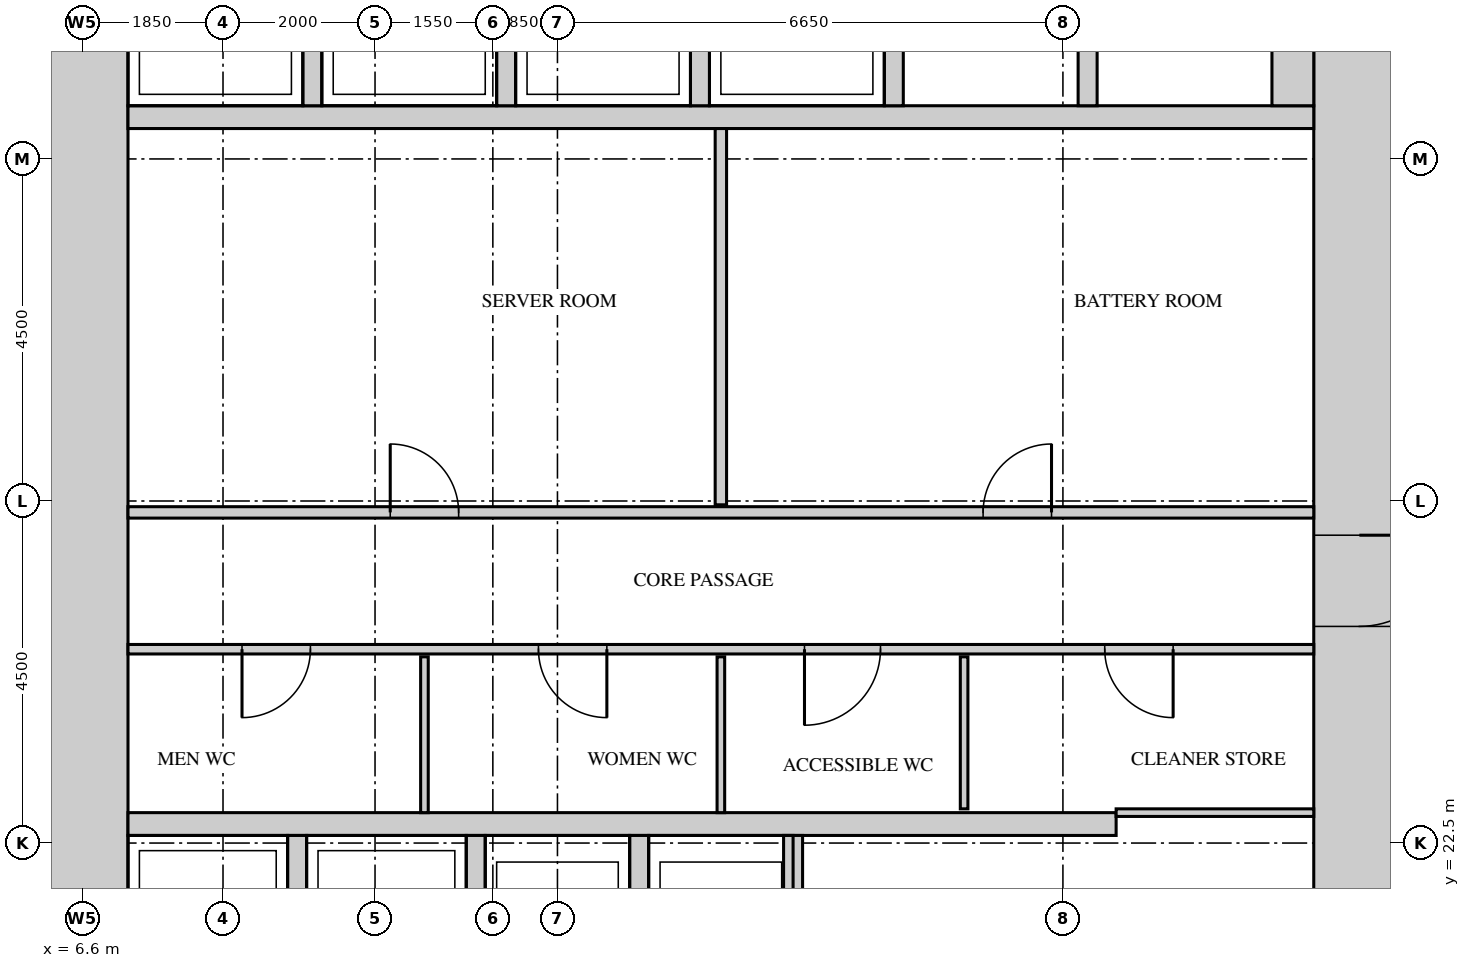
"""IFC4 building model, lengths in metres.
Left out: names, types, materials, properties, quantities, classifications, styles, units other than length and angle.
Written with IfcOpenShell. Run it as: python <this file> out.ifc"""

import sys

from ifc_helpers import new_model, si_unit, direction, frame, frame_2d, origin, place, context, subcontext, project, spatial, rectangle, extrude, source, transform, mapped, element, fill, save


model = new_model("IFC4")
c1 = context("Model", 3, precision=1e-05, world=origin(), true_north=direction((0.0, 1.0)))
c2 = subcontext(c1, "Body", "Model", "MODEL_VIEW")
j1 = project(units=[si_unit("LENGTHUNIT", "METRE"), si_unit("PLANEANGLEUNIT", "RADIAN")], contexts=[c1])
p1 = place(None, origin())
s1 = spatial("IfcSite", under=j1, at=p1, CompositionType="ELEMENT")
p2 = place(p1, origin())
s2 = spatial("IfcBuilding", under=s1, at=p2, CompositionType="ELEMENT")
p3 = place(p2, frame((0.0, 0.0, 60.0)))
s3 = spatial("IfcBuildingStorey", under=s2, at=p3, CompositionType="ELEMENT", Elevation=60.0)
m1 = source(origin(), c2, "Body", "SweptSolid", [
    extrude(rectangle(XDim=27.6, YDim=1.2, at=frame_2d((13.8, 0.0))), origin(), (0.0, 0.0, 1.0), 4.2),
])
p4 = place(p3, frame((23.4, 13.2, 0.0), z_axis=(0.0, 0.0, 1.0), x_axis=(0.0, 1.0, 0.0)))
e1 = element("IfcWall", 1, at=p4, inside=s3, PredefinedType="SHEAR", context=c2, shape_type="MappedRepresentation", body=[
    mapped(m1, transform((0.0, 0.0, 0.0))),
])
m2 = source(origin(), c2, "Body", "SweptSolid", [
    extrude(rectangle(XDim=1.8, YDim=2.1, at=frame_2d((0.9, 1.05))), frame((0.0, 0.61, 0.0), z_axis=(0.0, -1.0, 0.0), x_axis=(1.0, 0.0, 0.0)), (0.0, 0.0, 1.0), 1.22),
])
p5 = place(p4, frame((22.4, 0.0, 0.0)))
e2 = element("IfcOpeningElement", 2, at=p5, cuts=e1, PredefinedType="OPENING", context=c2, shape_type="MappedRepresentation", body=[
    mapped(m2, transform((0.0, 0.0, 0.0))),
])
m3 = source(origin(), c2, "Body", "SweptSolid", [
    extrude(rectangle(XDim=1.2, YDim=2.1, at=frame_2d((0.6, 1.05))), frame((0.0, 0.61, 0.0), z_axis=(0.0, -1.0, 0.0), x_axis=(1.0, 0.0, 0.0)), (0.0, 0.0, 1.0), 1.22),
])
p6 = place(p4, frame((12.15, 0.0, 0.0)))
e3 = element("IfcOpeningElement", 3, at=p6, cuts=e1, PredefinedType="OPENING", context=c2, shape_type="MappedRepresentation", body=[
    mapped(m3, transform((0.0, 0.0, 0.0))),
])
m4 = source(origin(), c2, "Body", "SweptSolid", [
    extrude(rectangle(XDim=0.9, YDim=2.1, at=frame_2d((0.45, 1.05))), frame((0.0, 0.61, 0.0), z_axis=(0.0, -1.0, 0.0), x_axis=(1.0, 0.0, 0.0)), (0.0, 0.0, 1.0), 1.22),
])
p7 = place(p4, frame((4.4, 0.0, 0.0)))
e4 = element("IfcOpeningElement", 4, at=p7, cuts=e1, PredefinedType="OPENING", context=c2, shape_type="MappedRepresentation", body=[
    mapped(m4, transform((0.0, 0.0, 0.0))),
])
p8 = place(p3, frame((6.6, 13.2, 0.0), z_axis=(0.0, 0.0, 1.0), x_axis=(0.0, 1.0, 0.0)))
e5 = element("IfcWall", 5, at=p8, inside=s3, PredefinedType="SHEAR", context=c2, shape_type="MappedRepresentation", body=[
    mapped(m1, transform((0.0, 0.0, 0.0))),
])
m5 = source(origin(), c2, "Body", "SweptSolid", [
    extrude(rectangle(XDim=13.0, YDim=0.3, at=frame_2d((6.5, 0.0))), origin(), (0.0, 0.0, 1.0), 4.2),
])
p9 = place(p3, frame((7.2, 22.75, 0.0), z_axis=(0.0, 0.0, 1.0), x_axis=(1.0, 0.0, 0.0)))
e6 = element("IfcWall", 6, at=p9, inside=s3, PredefinedType="STANDARD", context=c2, shape_type="MappedRepresentation", body=[
    mapped(m5, transform((0.0, 0.0, 0.0))),
])
m6 = source(origin(), c2, "Body", "SweptSolid", [
    extrude(rectangle(XDim=15.6, YDim=0.3, at=frame_2d((7.8, 0.0))), origin(), (0.0, 0.0, 1.0), 4.2),
])
p10 = place(p3, frame((7.2, 32.05, 0.0), z_axis=(0.0, 0.0, 1.0), x_axis=(1.0, 0.0, 0.0)))
e7 = element("IfcWall", 7, at=p10, inside=s3, PredefinedType="STANDARD", context=c2, shape_type="MappedRepresentation", body=[
    mapped(m6, transform((0.0, 0.0, 0.0))),
])
m7 = source(origin(), c2, "Body", "SweptSolid", [
    extrude(rectangle(XDim=3.1, YDim=0.25, at=frame_2d((1.55, 0.0))), origin(), (0.0, 0.0, 1.0), 4.2),
])
for number, where, z_axis, x_axis in (
    (8, (9.425, 19.5, 0.0), (0.0, 0.0, 1.0), (0.0, 1.0, 0.0)),
    (9, (11.775, 19.5, 0.0), (0.0, 0.0, 1.0), (0.0, 1.0, 0.0)),
    (10, (13.925, 19.5, 0.0), (0.0, 0.0, 1.0), (0.0, 1.0, 0.0)),
    (11, (15.95, 19.5, 0.0), (0.0, 0.0, 1.0), (0.0, 1.0, 0.0)),
):
    element("IfcWall", number, at=place(p3, frame(where, z_axis=z_axis, x_axis=x_axis)), inside=s3, PredefinedType="STANDARD", context=c2, shape_type="MappedRepresentation", body=[
        mapped(m7, transform((0.0, 0.0, 0.0))),
    ])
m8 = source(origin(), c2, "Body", "SweptSolid", [
    extrude(rectangle(XDim=2.4, YDim=0.25, at=frame_2d((1.2, 0.0))), origin(), (0.0, 0.0, 1.0), 4.2),
])
for number, where, z_axis, x_axis in (
    (12, (9.625, 32.2, 0.0), (0.0, 0.0, 1.0), (0.0, 1.0, 0.0)),
    (13, (12.175, 32.2, 0.0), (0.0, 0.0, 1.0), (0.0, 1.0, 0.0)),
    (14, (14.725, 32.2, 0.0), (0.0, 0.0, 1.0), (0.0, 1.0, 0.0)),
    (15, (17.275, 32.2, 0.0), (0.0, 0.0, 1.0), (0.0, 1.0, 0.0)),
    (16, (19.825, 32.2, 0.0), (0.0, 0.0, 1.0), (0.0, 1.0, 0.0)),
):
    element("IfcWall", number, at=place(p3, frame(where, z_axis=z_axis, x_axis=x_axis)), inside=s3, PredefinedType="STANDARD", context=c2, shape_type="MappedRepresentation", body=[
        mapped(m8, transform((0.0, 0.0, 0.0))),
    ])
m9 = source(origin(), c2, "Body", "SweptSolid", [
    extrude(rectangle(XDim=2.4, YDim=0.55, at=frame_2d((1.2, 0.0))), origin(), (0.0, 0.0, 1.0), 4.2),
])
p11 = place(p3, frame((22.525, 32.2, 0.0), z_axis=(0.0, 0.0, 1.0), x_axis=(0.0, 1.0, 0.0)))
e17 = element("IfcWall", 17, at=p11, inside=s3, PredefinedType="STANDARD", context=c2, shape_type="MappedRepresentation", body=[
    mapped(m9, transform((0.0, 0.0, 0.0))),
])
m10 = source(origin(), c2, "Body", "SweptSolid", [
    extrude(rectangle(XDim=2.05, YDim=0.1, at=frame_2d((1.025, 0.0))), origin(), (0.0, 0.0, 1.0), 4.3),
])
for number, where, z_axis, x_axis in (
    (18, (11.1, 22.9, 0.0), (0.0, 0.0, 1.0), (0.0, 1.0, 0.0)),
    (19, (15.0, 22.9, 0.0), (0.0, 0.0, 1.0), (0.0, 1.0, 0.0)),
):
    element("IfcWall", number, at=place(p3, frame(where, z_axis=z_axis, x_axis=x_axis)), inside=s3, PredefinedType="PARTITIONING", context=c2, shape_type="MappedRepresentation", body=[
        mapped(m10, transform((0.0, 0.0, 0.0))),
    ])
m11 = source(origin(), c2, "Body", "SweptSolid", [
    extrude(rectangle(XDim=2.6, YDim=0.1, at=frame_2d((1.3, 0.0))), origin(), (0.0, 0.0, 1.0), 4.3),
])
p12 = place(p3, frame((20.2, 22.9, 0.0), z_axis=(0.0, 0.0, 1.0), x_axis=(1.0, 0.0, 0.0)))
e20 = element("IfcWall", 20, at=p12, inside=s3, PredefinedType="PARTITIONING", context=c2, shape_type="MappedRepresentation", body=[
    mapped(m11, transform((0.0, 0.0, 0.0))),
])
m12 = source(origin(), c2, "Body", "SweptSolid", [
    extrude(rectangle(XDim=2.0, YDim=0.1, at=frame_2d((1.0, 0.0))), origin(), (0.0, 0.0, 1.0), 4.3),
])
p13 = place(p3, frame((18.2, 22.95, 0.0), z_axis=(0.0, 0.0, 1.0), x_axis=(0.0, 1.0, 0.0)))
e21 = element("IfcWall", 21, at=p13, inside=s3, PredefinedType="PARTITIONING", context=c2, shape_type="MappedRepresentation", body=[
    mapped(m12, transform((0.0, 0.0, 0.0))),
])
m13 = source(origin(), c2, "Body", "SweptSolid", [
    extrude(rectangle(XDim=15.6, YDim=0.125, at=frame_2d((7.8, 0.0))), origin(), (0.0, 0.0, 1.0), 4.3),
])
p14 = place(p3, frame((7.2, 25.05, 0.0), z_axis=(0.0, 0.0, 1.0), x_axis=(1.0, 0.0, 0.0)))
e22 = element("IfcWall", 22, at=p14, inside=s3, PredefinedType="PARTITIONING", context=c2, shape_type="MappedRepresentation", body=[
    mapped(m13, transform((0.0, 0.0, 0.0))),
])
m14 = source(origin(), c2, "Body", "SweptSolid", [
    extrude(rectangle(XDim=0.9, YDim=2.1, at=frame_2d((0.45, 1.05))), frame((0.0, 0.073, 0.0), z_axis=(0.0, -1.0, 0.0), x_axis=(1.0, 0.0, 0.0)), (0.0, 0.0, 1.0), 0.145),
])
p15 = place(p14, frame((1.5, 0.0, 0.0)))
e23 = element("IfcOpeningElement", 23, at=p15, cuts=e22, PredefinedType="OPENING", context=c2, shape_type="MappedRepresentation", body=[
    mapped(m14, transform((0.0, 0.0, 0.0))),
])
p16 = place(p14, frame((5.4, 0.0, 0.0)))
e24 = element("IfcOpeningElement", 24, at=p16, cuts=e22, PredefinedType="OPENING", context=c2, shape_type="MappedRepresentation", body=[
    mapped(m14, transform((0.0, 0.0, 0.0))),
])
m15 = source(origin(), c2, "Body", "SweptSolid", [
    extrude(rectangle(XDim=1.0, YDim=2.1, at=frame_2d((0.5, 1.05))), frame((0.0, 0.073, 0.0), z_axis=(0.0, -1.0, 0.0), x_axis=(1.0, 0.0, 0.0)), (0.0, 0.0, 1.0), 0.145),
])
p17 = place(p14, frame((8.9, 0.0, 0.0)))
e25 = element("IfcOpeningElement", 25, at=p17, cuts=e22, PredefinedType="OPENING", context=c2, shape_type="MappedRepresentation", body=[
    mapped(m15, transform((0.0, 0.0, 0.0))),
])
p18 = place(p14, frame((12.85, 0.0, 0.0)))
e26 = element("IfcOpeningElement", 26, at=p18, cuts=e22, PredefinedType="OPENING", context=c2, shape_type="MappedRepresentation", body=[
    mapped(m14, transform((0.0, 0.0, 0.0))),
])
m16 = source(origin(), c2, "Body", "SweptSolid", [
    extrude(rectangle(XDim=15.6, YDim=0.15, at=frame_2d((7.8, 0.0))), origin(), (0.0, 0.0, 1.0), 4.3),
])
p19 = place(p3, frame((7.2, 26.85, 0.0), z_axis=(0.0, 0.0, 1.0), x_axis=(1.0, 0.0, 0.0)))
e27 = element("IfcWall", 27, at=p19, inside=s3, PredefinedType="PARTITIONING", context=c2, shape_type="MappedRepresentation", body=[
    mapped(m16, transform((0.0, 0.0, 0.0))),
])
m17 = source(origin(), c2, "Body", "SweptSolid", [
    extrude(rectangle(XDim=0.9, YDim=2.1, at=frame_2d((0.45, 1.05))), frame((0.0, 0.085, 0.0), z_axis=(0.0, -1.0, 0.0), x_axis=(1.0, 0.0, 0.0)), (0.0, 0.0, 1.0), 0.17),
])
p20 = place(p19, frame((3.45, 0.0, 0.0)))
e28 = element("IfcOpeningElement", 28, at=p20, cuts=e27, PredefinedType="OPENING", context=c2, shape_type="MappedRepresentation", body=[
    mapped(m17, transform((0.0, 0.0, 0.0))),
])
p21 = place(p19, frame((11.25, 0.0, 0.0)))
e29 = element("IfcOpeningElement", 29, at=p21, cuts=e27, PredefinedType="OPENING", context=c2, shape_type="MappedRepresentation", body=[
    mapped(m17, transform((0.0, 0.0, 0.0))),
])
m18 = source(origin(), c2, "Body", "SweptSolid", [
    extrude(rectangle(XDim=4.95, YDim=0.15, at=frame_2d((2.475, 0.0))), origin(), (0.0, 0.0, 1.0), 4.3),
])
p22 = place(p3, frame((15.0, 26.95, 0.0), z_axis=(0.0, 0.0, 1.0), x_axis=(0.0, 1.0, 0.0)))
e30 = element("IfcWall", 30, at=p22, inside=s3, PredefinedType="PARTITIONING", context=c2, shape_type="MappedRepresentation", body=[
    mapped(m18, transform((0.0, 0.0, 0.0))),
])
m19 = source(origin(), c2, "Body", "SweptSolid", [
    extrude(rectangle(XDim=1.2, YDim=2.1, at=frame_2d((0.6, 1.05))), frame((0.0, 0.55, 0.0), z_axis=(0.0, -1.0, 0.0), x_axis=(1.0, 0.0, 0.0)), (0.0, 0.0, 1.0), 1.1),
])
p23 = place(p6, origin())
e31 = element("IfcDoor", 31, at=p23, inside=s3, OperationType="SINGLE_SWING_RIGHT", PredefinedType="DOOR", context=c2, shape_type="MappedRepresentation", body=[
    mapped(m19, transform((0.0, 0.0, 0.0))),
])
fill(e3, e31)
m20 = source(origin(), c2, "Body", "SweptSolid", [
    extrude(rectangle(XDim=0.9, YDim=2.1, at=frame_2d((0.45, 1.05))), frame((0.0, 0.025, 0.0), z_axis=(0.0, -1.0, 0.0), x_axis=(1.0, 0.0, 0.0)), (0.0, 0.0, 1.0), 0.05),
])
p24 = place(p20, origin())
e32 = element("IfcDoor", 32, at=p24, inside=s3, OperationType="SINGLE_SWING_RIGHT", PredefinedType="DOOR", context=c2, shape_type="MappedRepresentation", body=[
    mapped(m20, transform((0.0, 0.0, 0.0))),
])
fill(e28, e32)
p25 = place(p21, origin())
e33 = element("IfcDoor", 33, at=p25, inside=s3, OperationType="SINGLE_SWING_LEFT", PredefinedType="DOOR", context=c2, shape_type="MappedRepresentation", body=[
    mapped(m20, transform((0.0, 0.0, 0.0))),
])
fill(e29, e33)
p26 = place(p15, origin())
e34 = element("IfcDoor", 34, at=p26, inside=s3, OperationType="SINGLE_SWING_LEFT", PredefinedType="DOOR", context=c2, shape_type="MappedRepresentation", body=[
    mapped(m20, transform((0.0, 0.0, 0.0))),
])
fill(e23, e34)
p27 = place(p16, origin())
e35 = element("IfcDoor", 35, at=p27, inside=s3, OperationType="SINGLE_SWING_RIGHT", PredefinedType="DOOR", context=c2, shape_type="MappedRepresentation", body=[
    mapped(m20, transform((0.0, 0.0, 0.0))),
])
fill(e24, e35)
m21 = source(origin(), c2, "Body", "SweptSolid", [
    extrude(rectangle(XDim=1.0, YDim=2.1, at=frame_2d((0.5, 1.05))), frame((0.0, 0.025, 0.0), z_axis=(0.0, -1.0, 0.0), x_axis=(1.0, 0.0, 0.0)), (0.0, 0.0, 1.0), 0.05),
])
p28 = place(p17, origin())
e36 = element("IfcDoor", 36, at=p28, inside=s3, OperationType="SINGLE_SWING_LEFT", PredefinedType="DOOR", context=c2, shape_type="MappedRepresentation", body=[
    mapped(m21, transform((0.0, 0.0, 0.0))),
])
fill(e25, e36)
p29 = place(p18, origin())
e37 = element("IfcDoor", 37, at=p29, inside=s3, OperationType="SINGLE_SWING_RIGHT", PredefinedType="DOOR", context=c2, shape_type="MappedRepresentation", body=[
    mapped(m20, transform((0.0, 0.0, 0.0))),
])
fill(e26, e37)
save(model, sys.argv[1])
